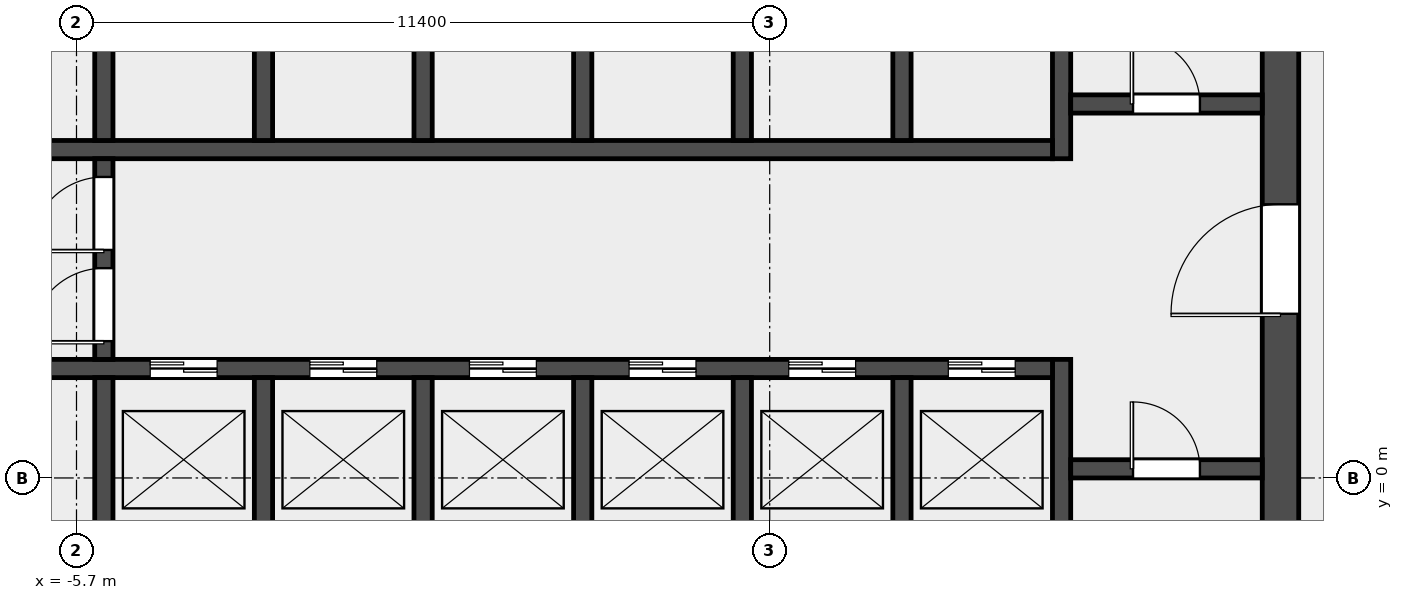
"""IFC4 building model, lengths in metres.
Left out: names, types, materials, properties, quantities, classifications, styles, units other than length and angle.
Written with IfcOpenShell. Run it as: python <this file> out.ifc"""

import sys

from ifc_helpers import new_model, si_unit, direction, frame, frame_2d, origin, place, context, subcontext, project, spatial, rectangle, extrude, element, fill, save


model = new_model("IFC4")
c1 = context("Model", 3, precision=1e-05, world=origin(), true_north=direction((0.0, 1.0)))
c2 = subcontext(c1, "Body", "Model", "MODEL_VIEW")
j1 = project(units=[si_unit("LENGTHUNIT", "METRE"), si_unit("PLANEANGLEUNIT", "RADIAN")], contexts=[c1])
p1 = place(None, origin())
s1 = spatial("IfcSite", under=j1, at=p1, CompositionType="ELEMENT")
p2 = place(p1, origin())
s2 = spatial("IfcBuilding", under=s1, at=p2, CompositionType="ELEMENT")
p3 = place(p2, frame((0.0, 0.0, 74.2)))
s3 = spatial("IfcBuildingStorey", under=s2, at=p3, CompositionType="ELEMENT", Elevation=74.2)
p4 = place(p3, frame((14.1, -6.6, 0.0), z_axis=(0.0, 0.0, 1.0), x_axis=(0.0, 1.0, 0.0)))
e1 = element("IfcWall", 1, at=p4, inside=s3, PredefinedType="SHEAR", context=c2, shape_type="SweptSolid", body=[
    extrude(rectangle(XDim=19.5, YDim=0.6, at=frame_2d((9.75, 0.0))), origin(), (0.0, 0.0, 1.0), 4.5),
])
p5 = place(p4, frame((9.3, 0.0, 0.0)))
e2 = element("IfcOpeningElement", 2, at=p5, cuts=e1, PredefinedType="OPENING", context=c2, shape_type="SweptSolid", body=[
    extrude(rectangle(XDim=1.8, YDim=2.1, at=frame_2d((0.9, 1.05))), frame((0.0, 0.312, 0.0), z_axis=(0.0, -1.0, 0.0), x_axis=(1.0, 0.0, 0.0)), (0.0, 0.0, 1.0), 0.624),
])
p6 = place(p3, frame((10.5, -6.6, 0.0), z_axis=(0.0, 0.0, 1.0), x_axis=(0.0, 1.0, 0.0)))
e3 = element("IfcWall", 3, at=p6, inside=s3, PredefinedType="SHEAR", context=c2, shape_type="SweptSolid", body=[
    extrude(rectangle(XDim=8.55, YDim=0.3, at=frame_2d((4.275, 0.0))), origin(), (0.0, 0.0, 1.0), 4.5),
])
p7 = place(p3, frame((10.5, 5.25, 0.0), z_axis=(0.0, 0.0, 1.0), x_axis=(0.0, 1.0, 0.0)))
e4 = element("IfcWall", 4, at=p7, inside=s3, PredefinedType="SHEAR", context=c2, shape_type="SweptSolid", body=[
    extrude(rectangle(XDim=7.65, YDim=0.3, at=frame_2d((3.825, 0.0))), origin(), (0.0, 0.0, 1.0), 4.5),
])
p8 = place(p3, frame((10.65, 0.15, 0.0), z_axis=(0.0, 0.0, 1.0), x_axis=(1.0, 0.0, 0.0)))
e5 = element("IfcWall", 5, at=p8, inside=s3, PredefinedType="SOLIDWALL", context=c2, shape_type="SweptSolid", body=[
    extrude(rectangle(XDim=3.15, YDim=0.3, at=frame_2d((1.575, 0.0))), origin(), (0.0, 0.0, 1.0), 4.5),
])
p9 = place(p8, frame((1.025, 0.0, 0.0)))
e6 = element("IfcOpeningElement", 6, at=p9, cuts=e5, PredefinedType="OPENING", context=c2, shape_type="SweptSolid", body=[
    extrude(rectangle(XDim=1.1, YDim=2.1, at=frame_2d((0.55, 1.05))), frame((0.0, 0.162, 0.0), z_axis=(0.0, -1.0, 0.0), x_axis=(1.0, 0.0, 0.0)), (0.0, 0.0, 1.0), 0.324),
])
p10 = place(p3, frame((10.65, 6.15, 0.0), z_axis=(0.0, 0.0, 1.0), x_axis=(1.0, 0.0, 0.0)))
e7 = element("IfcWall", 7, at=p10, inside=s3, PredefinedType="SOLIDWALL", context=c2, shape_type="SweptSolid", body=[
    extrude(rectangle(XDim=3.15, YDim=0.3, at=frame_2d((1.575, 0.0))), origin(), (0.0, 0.0, 1.0), 4.5),
])
p11 = place(p10, frame((1.025, 0.0, 0.0)))
e8 = element("IfcOpeningElement", 8, at=p11, cuts=e7, PredefinedType="OPENING", context=c2, shape_type="SweptSolid", body=[
    extrude(rectangle(XDim=1.1, YDim=2.1, at=frame_2d((0.55, 1.05))), frame((0.0, 0.162, 0.0), z_axis=(0.0, -1.0, 0.0), x_axis=(1.0, 0.0, 0.0)), (0.0, 0.0, 1.0), 0.324),
])
p12 = place(p3, frame((-10.35, 1.8, 0.0), z_axis=(0.0, 0.0, 1.0), x_axis=(1.0, 0.0, 0.0)))
e9 = element("IfcWall", 9, at=p12, inside=s3, PredefinedType="SOLIDWALL", context=c2, shape_type="SweptSolid", body=[
    extrude(rectangle(XDim=20.7, YDim=0.3, at=frame_2d((10.35, 0.0))), origin(), (0.0, 0.0, 1.0), 4.5),
])
p13 = place(p12, frame((0.512, 0.0, 0.0)))
e10 = element("IfcOpeningElement", 10, at=p13, cuts=e9, PredefinedType="OPENING", context=c2, shape_type="SweptSolid", body=[
    extrude(rectangle(XDim=1.3, YDim=2.1, at=frame_2d((0.65, 1.05))), frame((0.0, 0.162, 0.0), z_axis=(0.0, -1.0, 0.0), x_axis=(1.0, 0.0, 0.0)), (0.0, 0.0, 1.0), 0.324),
])
p14 = place(p12, frame((5.863, 0.0, 0.0)))
e11 = element("IfcOpeningElement", 11, at=p14, cuts=e9, PredefinedType="OPENING", context=c2, shape_type="SweptSolid", body=[
    extrude(rectangle(XDim=1.1, YDim=2.1, at=frame_2d((0.55, 1.05))), frame((0.0, 0.162, 0.0), z_axis=(0.0, -1.0, 0.0), x_axis=(1.0, 0.0, 0.0)), (0.0, 0.0, 1.0), 0.324),
])
p15 = place(p12, frame((8.488, 0.0, 0.0)))
e12 = element("IfcOpeningElement", 12, at=p15, cuts=e9, PredefinedType="OPENING", context=c2, shape_type="SweptSolid", body=[
    extrude(rectangle(XDim=1.1, YDim=2.1, at=frame_2d((0.55, 1.05))), frame((0.0, 0.162, 0.0), z_axis=(0.0, -1.0, 0.0), x_axis=(1.0, 0.0, 0.0)), (0.0, 0.0, 1.0), 0.324),
])
p16 = place(p12, frame((11.113, 0.0, 0.0)))
e13 = element("IfcOpeningElement", 13, at=p16, cuts=e9, PredefinedType="OPENING", context=c2, shape_type="SweptSolid", body=[
    extrude(rectangle(XDim=1.1, YDim=2.1, at=frame_2d((0.55, 1.05))), frame((0.0, 0.162, 0.0), z_axis=(0.0, -1.0, 0.0), x_axis=(1.0, 0.0, 0.0)), (0.0, 0.0, 1.0), 0.324),
])
p17 = place(p12, frame((13.738, 0.0, 0.0)))
e14 = element("IfcOpeningElement", 14, at=p17, cuts=e9, PredefinedType="OPENING", context=c2, shape_type="SweptSolid", body=[
    extrude(rectangle(XDim=1.1, YDim=2.1, at=frame_2d((0.55, 1.05))), frame((0.0, 0.162, 0.0), z_axis=(0.0, -1.0, 0.0), x_axis=(1.0, 0.0, 0.0)), (0.0, 0.0, 1.0), 0.324),
])
p18 = place(p12, frame((16.363, 0.0, 0.0)))
e15 = element("IfcOpeningElement", 15, at=p18, cuts=e9, PredefinedType="OPENING", context=c2, shape_type="SweptSolid", body=[
    extrude(rectangle(XDim=1.1, YDim=2.1, at=frame_2d((0.55, 1.05))), frame((0.0, 0.162, 0.0), z_axis=(0.0, -1.0, 0.0), x_axis=(1.0, 0.0, 0.0)), (0.0, 0.0, 1.0), 0.324),
])
p19 = place(p12, frame((18.988, 0.0, 0.0)))
e16 = element("IfcOpeningElement", 16, at=p19, cuts=e9, PredefinedType="OPENING", context=c2, shape_type="SweptSolid", body=[
    extrude(rectangle(XDim=1.1, YDim=2.1, at=frame_2d((0.55, 1.05))), frame((0.0, 0.162, 0.0), z_axis=(0.0, -1.0, 0.0), x_axis=(1.0, 0.0, 0.0)), (0.0, 0.0, 1.0), 0.324),
])
p20 = place(p3, frame((-10.35, 5.4, 0.0), z_axis=(0.0, 0.0, 1.0), x_axis=(1.0, 0.0, 0.0)))
e17 = element("IfcWall", 17, at=p20, inside=s3, PredefinedType="SOLIDWALL", context=c2, shape_type="SweptSolid", body=[
    extrude(rectangle(XDim=20.7, YDim=0.3, at=frame_2d((10.35, 0.0))), origin(), (0.0, 0.0, 1.0), 4.5),
])
p21 = place(p20, frame((0.512, 0.0, 0.0)))
e18 = element("IfcOpeningElement", 18, at=p21, cuts=e17, PredefinedType="OPENING", context=c2, shape_type="SweptSolid", body=[
    extrude(rectangle(XDim=1.3, YDim=2.1, at=frame_2d((0.65, 1.05))), frame((0.0, 0.162, 0.0), z_axis=(0.0, -1.0, 0.0), x_axis=(1.0, 0.0, 0.0)), (0.0, 0.0, 1.0), 0.324),
])
for number, where, z_axis, x_axis in (
    (19, (-5.25, -1.05, 0.0), (0.0, 0.0, 1.0), (0.0, 1.0, 0.0)),
    (20, (-2.625, -1.05, 0.0), (0.0, 0.0, 1.0), (0.0, 1.0, 0.0)),
    (21, (0.0, -1.05, 0.0), (0.0, 0.0, 1.0), (0.0, 1.0, 0.0)),
    (22, (2.625, -1.05, 0.0), (0.0, 0.0, 1.0), (0.0, 1.0, 0.0)),
    (23, (5.25, -1.05, 0.0), (0.0, 0.0, 1.0), (0.0, 1.0, 0.0)),
    (24, (7.875, -1.05, 0.0), (0.0, 0.0, 1.0), (0.0, 1.0, 0.0)),
    (25, (-5.25, 5.55, 0.0), (0.0, 0.0, 1.0), (0.0, 1.0, 0.0)),
    (26, (-2.625, 5.55, 0.0), (0.0, 0.0, 1.0), (0.0, 1.0, 0.0)),
    (27, (0.0, 5.55, 0.0), (0.0, 0.0, 1.0), (0.0, 1.0, 0.0)),
    (28, (2.625, 5.55, 0.0), (0.0, 0.0, 1.0), (0.0, 1.0, 0.0)),
    (29, (5.25, 5.55, 0.0), (0.0, 0.0, 1.0), (0.0, 1.0, 0.0)),
    (30, (7.875, 5.55, 0.0), (0.0, 0.0, 1.0), (0.0, 1.0, 0.0)),
):
    element("IfcWall", number, at=place(p3, frame(where, z_axis=z_axis, x_axis=x_axis)), inside=s3, PredefinedType="SOLIDWALL", context=c2, shape_type="SweptSolid", body=[
        extrude(rectangle(XDim=2.7, YDim=0.3, at=frame_2d((1.35, 0.0))), origin(), (0.0, 0.0, 1.0), 4.5),
    ])
p22 = place(p3, frame((-5.25, 1.95, 0.0), z_axis=(0.0, 0.0, 1.0), x_axis=(0.0, 1.0, 0.0)))
e31 = element("IfcWall", 31, at=p22, inside=s3, PredefinedType="SOLIDWALL", context=c2, shape_type="SweptSolid", body=[
    extrude(rectangle(XDim=3.3, YDim=0.3, at=frame_2d((1.65, 0.0))), origin(), (0.0, 0.0, 1.0), 4.5),
])
p23 = place(p22, frame((0.3, 0.0, 0.0)))
e32 = element("IfcOpeningElement", 32, at=p23, cuts=e31, PredefinedType="OPENING", context=c2, shape_type="SweptSolid", body=[
    extrude(rectangle(XDim=1.2, YDim=2.1, at=frame_2d((0.6, 1.05))), frame((0.0, 0.162, 0.0), z_axis=(0.0, -1.0, 0.0), x_axis=(1.0, 0.0, 0.0)), (0.0, 0.0, 1.0), 0.324),
])
p24 = place(p22, frame((1.8, 0.0, 0.0)))
e33 = element("IfcOpeningElement", 33, at=p24, cuts=e31, PredefinedType="OPENING", context=c2, shape_type="SweptSolid", body=[
    extrude(rectangle(XDim=1.2, YDim=2.1, at=frame_2d((0.6, 1.05))), frame((0.0, 0.162, 0.0), z_axis=(0.0, -1.0, 0.0), x_axis=(1.0, 0.0, 0.0)), (0.0, 0.0, 1.0), 0.324),
])
p25 = place(p9, origin())
e34 = element("IfcDoor", 34, at=p25, inside=s3, OperationType="SINGLE_SWING_RIGHT", PredefinedType="DOOR", context=c2, shape_type="SweptSolid", body=[
    extrude(rectangle(XDim=1.1, YDim=2.1, at=frame_2d((0.55, 1.05))), frame((0.0, 0.025, 0.0), z_axis=(0.0, -1.0, 0.0), x_axis=(1.0, 0.0, 0.0)), (0.0, 0.0, 1.0), 0.05),
])
fill(e6, e34)
p26 = place(p11, origin())
e35 = element("IfcDoor", 35, at=p26, inside=s3, OperationType="SINGLE_SWING_RIGHT", PredefinedType="DOOR", context=c2, shape_type="SweptSolid", body=[
    extrude(rectangle(XDim=1.1, YDim=2.1, at=frame_2d((0.55, 1.05))), frame((0.0, 0.025, 0.0), z_axis=(0.0, -1.0, 0.0), x_axis=(1.0, 0.0, 0.0)), (0.0, 0.0, 1.0), 0.05),
])
fill(e8, e35)
p27 = place(p5, origin())
e36 = element("IfcDoor", 36, at=p27, inside=s3, OperationType="DOUBLE_DOOR_SINGLE_SWING", PredefinedType="DOOR", context=c2, shape_type="SweptSolid", body=[
    extrude(rectangle(XDim=1.8, YDim=2.1, at=frame_2d((0.9, 1.05))), frame((0.0, 0.025, 0.0), z_axis=(0.0, -1.0, 0.0), x_axis=(1.0, 0.0, 0.0)), (0.0, 0.0, 1.0), 0.05),
])
fill(e2, e36)
p28 = place(p23, origin())
e37 = element("IfcDoor", 37, at=p28, inside=s3, OperationType="SINGLE_SWING_LEFT", PredefinedType="DOOR", context=c2, shape_type="SweptSolid", body=[
    extrude(rectangle(XDim=1.2, YDim=2.1, at=frame_2d((0.6, 1.05))), frame((0.0, 0.025, 0.0), z_axis=(0.0, -1.0, 0.0), x_axis=(1.0, 0.0, 0.0)), (0.0, 0.0, 1.0), 0.05),
])
fill(e32, e37)
p29 = place(p24, origin())
e38 = element("IfcDoor", 38, at=p29, inside=s3, OperationType="SINGLE_SWING_RIGHT", PredefinedType="DOOR", context=c2, shape_type="SweptSolid", body=[
    extrude(rectangle(XDim=1.2, YDim=2.1, at=frame_2d((0.6, 1.05))), frame((0.0, 0.025, 0.0), z_axis=(0.0, -1.0, 0.0), x_axis=(1.0, 0.0, 0.0)), (0.0, 0.0, 1.0), 0.05),
])
fill(e33, e38)
p30 = place(p14, origin())
e39 = element("IfcDoor", 39, at=p30, inside=s3, OperationType="DOUBLE_DOOR_SLIDING", PredefinedType="DOOR", context=c2, shape_type="SweptSolid", body=[
    extrude(rectangle(XDim=1.1, YDim=2.1, at=frame_2d((0.55, 1.05))), frame((0.0, 0.025, 0.0), z_axis=(0.0, -1.0, 0.0), x_axis=(1.0, 0.0, 0.0)), (0.0, 0.0, 1.0), 0.05),
])
fill(e11, e39)
p31 = place(p15, origin())
e40 = element("IfcDoor", 40, at=p31, inside=s3, OperationType="DOUBLE_DOOR_SLIDING", PredefinedType="DOOR", context=c2, shape_type="SweptSolid", body=[
    extrude(rectangle(XDim=1.1, YDim=2.1, at=frame_2d((0.55, 1.05))), frame((0.0, 0.025, 0.0), z_axis=(0.0, -1.0, 0.0), x_axis=(1.0, 0.0, 0.0)), (0.0, 0.0, 1.0), 0.05),
])
fill(e12, e40)
p32 = place(p16, origin())
e41 = element("IfcDoor", 41, at=p32, inside=s3, OperationType="DOUBLE_DOOR_SLIDING", PredefinedType="DOOR", context=c2, shape_type="SweptSolid", body=[
    extrude(rectangle(XDim=1.1, YDim=2.1, at=frame_2d((0.55, 1.05))), frame((0.0, 0.025, 0.0), z_axis=(0.0, -1.0, 0.0), x_axis=(1.0, 0.0, 0.0)), (0.0, 0.0, 1.0), 0.05),
])
fill(e13, e41)
p33 = place(p17, origin())
e42 = element("IfcDoor", 42, at=p33, inside=s3, OperationType="DOUBLE_DOOR_SLIDING", PredefinedType="DOOR", context=c2, shape_type="SweptSolid", body=[
    extrude(rectangle(XDim=1.1, YDim=2.1, at=frame_2d((0.55, 1.05))), frame((0.0, 0.025, 0.0), z_axis=(0.0, -1.0, 0.0), x_axis=(1.0, 0.0, 0.0)), (0.0, 0.0, 1.0), 0.05),
])
fill(e14, e42)
p34 = place(p18, origin())
e43 = element("IfcDoor", 43, at=p34, inside=s3, OperationType="DOUBLE_DOOR_SLIDING", PredefinedType="DOOR", context=c2, shape_type="SweptSolid", body=[
    extrude(rectangle(XDim=1.1, YDim=2.1, at=frame_2d((0.55, 1.05))), frame((0.0, 0.025, 0.0), z_axis=(0.0, -1.0, 0.0), x_axis=(1.0, 0.0, 0.0)), (0.0, 0.0, 1.0), 0.05),
])
fill(e15, e43)
p35 = place(p19, origin())
e44 = element("IfcDoor", 44, at=p35, inside=s3, OperationType="DOUBLE_DOOR_SLIDING", PredefinedType="DOOR", context=c2, shape_type="SweptSolid", body=[
    extrude(rectangle(XDim=1.1, YDim=2.1, at=frame_2d((0.55, 1.05))), frame((0.0, 0.025, 0.0), z_axis=(0.0, -1.0, 0.0), x_axis=(1.0, 0.0, 0.0)), (0.0, 0.0, 1.0), 0.05),
])
fill(e16, e44)
save(model, sys.argv[1])
